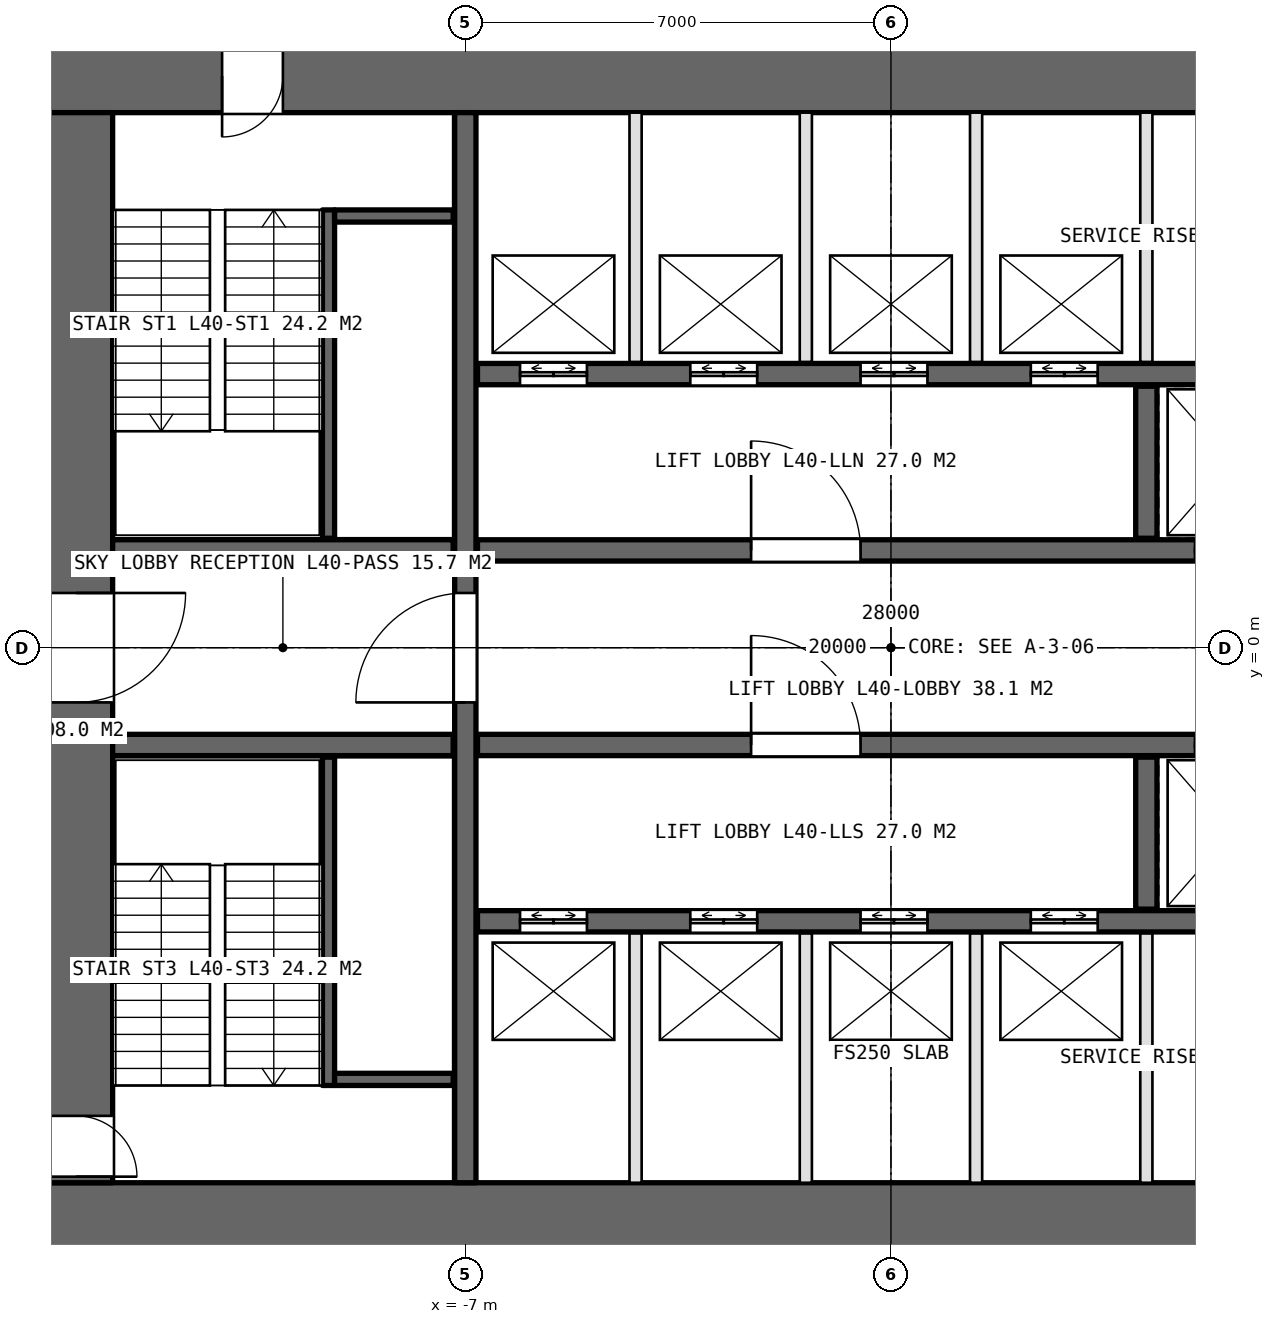
"""IFC4 building model, lengths in metres.
Left out: names, types, materials, properties, quantities, classifications, styles, units other than length and angle.
Written with IfcOpenShell. Run it as: python <this file> out.ifc"""

import sys

from ifc_helpers import new_model, si_unit, direction, frame, frame_2d, origin, place, context, subcontext, project, spatial, rectangle, extrude, element, fill, save


model = new_model("IFC4")
c1 = context("Model", 3, precision=1e-05, world=origin(), true_north=direction((0.0, 1.0)))
c2 = subcontext(c1, "Body", "Model", "MODEL_VIEW")
j1 = project(units=[si_unit("LENGTHUNIT", "METRE"), si_unit("PLANEANGLEUNIT", "RADIAN")], contexts=[c1])
p1 = place(None, origin())
s1 = spatial("IfcSite", under=j1, at=p1, CompositionType="ELEMENT")
p2 = place(p1, origin())
s2 = spatial("IfcBuilding", under=s1, at=p2, CompositionType="ELEMENT")
p3 = place(p2, frame((0.0, 0.0, 184.8)))
s3 = spatial("IfcBuildingStorey", under=s2, at=p3, CompositionType="ELEMENT", Elevation=184.8)
p4 = place(p3, frame((-14.0, -9.4, 0.0), z_axis=(0.0, 0.0, 1.0), x_axis=(1.0, 0.0, 0.0)))
e1 = element("IfcWall", 1, at=p4, inside=s3, PredefinedType="SHEAR", context=c2, shape_type="SweptSolid", body=[
    extrude(rectangle(XDim=28.0, YDim=1.2, at=frame_2d((14.0, 0.0))), origin(), (0.0, 0.0, 1.0), 5.0),
])
p5 = place(p4, frame((22.9, 0.0, 0.0)))
e2 = element("IfcOpeningElement", 2, at=p5, cuts=e1, PredefinedType="OPENING", context=c2, shape_type="SweptSolid", body=[
    extrude(rectangle(XDim=2.2, YDim=2.7, at=frame_2d((1.1, 1.35))), frame((0.0, 0.61, 0.0), z_axis=(0.0, -1.0, 0.0), x_axis=(1.0, 0.0, 0.0)), (0.0, 0.0, 1.0), 1.22),
])
p6 = place(p3, frame((14.0, 9.4, 0.0), z_axis=(0.0, 0.0, 1.0), x_axis=(-1.0, 0.0, 0.0)))
e3 = element("IfcWall", 3, at=p6, inside=s3, PredefinedType="SHEAR", context=c2, shape_type="SweptSolid", body=[
    extrude(rectangle(XDim=28.0, YDim=1.2, at=frame_2d((14.0, 0.0))), origin(), (0.0, 0.0, 1.0), 5.0),
])
p7 = place(p6, frame((24.0, 0.0, 0.0)))
e4 = element("IfcOpeningElement", 4, at=p7, cuts=e3, PredefinedType="OPENING", context=c2, shape_type="SweptSolid", body=[
    extrude(rectangle(XDim=1.0, YDim=2.4, at=frame_2d((0.5, 1.2))), frame((0.0, 0.61, 0.0), z_axis=(0.0, -1.0, 0.0), x_axis=(1.0, 0.0, 0.0)), (0.0, 0.0, 1.0), 1.22),
])
p8 = place(p3, frame((-13.4, 8.8, 0.0), z_axis=(0.0, 0.0, 1.0), x_axis=(0.0, -1.0, 0.0)))
e5 = element("IfcWall", 5, at=p8, inside=s3, PredefinedType="SHEAR", context=c2, shape_type="SweptSolid", body=[
    extrude(rectangle(XDim=17.6, YDim=1.2, at=frame_2d((8.8, 0.0))), origin(), (0.0, 0.0, 1.0), 5.0),
])
p9 = place(p8, frame((7.9, 0.0, 0.0)))
e6 = element("IfcOpeningElement", 6, at=p9, cuts=e5, PredefinedType="OPENING", context=c2, shape_type="SweptSolid", body=[
    extrude(rectangle(XDim=1.8, YDim=2.4, at=frame_2d((0.9, 1.2))), frame((0.0, 0.61, 0.0), z_axis=(0.0, -1.0, 0.0), x_axis=(1.0, 0.0, 0.0)), (0.0, 0.0, 1.0), 1.22),
])
p10 = place(p8, frame((16.5, 0.0, 0.0)))
e7 = element("IfcOpeningElement", 7, at=p10, cuts=e5, PredefinedType="OPENING", context=c2, shape_type="SweptSolid", body=[
    extrude(rectangle(XDim=1.0, YDim=2.4, at=frame_2d((0.5, 1.2))), frame((0.0, 0.61, 0.0), z_axis=(0.0, -1.0, 0.0), x_axis=(1.0, 0.0, 0.0)), (0.0, 0.0, 1.0), 1.22),
])
p11 = place(p3, frame((-7.0, -8.8, 0.0), z_axis=(0.0, 0.0, 1.0), x_axis=(0.0, 1.0, 0.0)))
e8 = element("IfcWall", 8, at=p11, inside=s3, PredefinedType="SHEAR", context=c2, shape_type="SweptSolid", body=[
    extrude(rectangle(XDim=17.6, YDim=0.35, at=frame_2d((8.8, 0.0))), origin(), (0.0, 0.0, 1.0), 5.0),
])
p12 = place(p11, frame((7.9, 0.0, 0.0)))
e9 = element("IfcOpeningElement", 9, at=p12, cuts=e8, PredefinedType="OPENING", context=c2, shape_type="SweptSolid", body=[
    extrude(rectangle(XDim=1.8, YDim=2.4, at=frame_2d((0.9, 1.2))), frame((0.0, 0.185, 0.0), z_axis=(0.0, -1.0, 0.0), x_axis=(1.0, 0.0, 0.0)), (0.0, 0.0, 1.0), 0.37),
])
p13 = place(p3, frame((-6.8, 1.6, 0.0), z_axis=(0.0, 0.0, 1.0), x_axis=(1.0, 0.0, 0.0)))
e10 = element("IfcWall", 10, at=p13, inside=s3, PredefinedType="SHEAR", context=c2, shape_type="SweptSolid", body=[
    extrude(rectangle(XDim=13.6, YDim=0.35, at=frame_2d((6.8, 0.0))), origin(), (0.0, 0.0, 1.0), 5.0),
])
p14 = place(p13, frame((4.5, 0.0, 0.0)))
e11 = element("IfcOpeningElement", 11, at=p14, cuts=e10, PredefinedType="OPENING", context=c2, shape_type="SweptSolid", body=[
    extrude(rectangle(XDim=1.8, YDim=2.4, at=frame_2d((0.9, 1.2))), frame((0.0, 0.185, 0.0), z_axis=(0.0, -1.0, 0.0), x_axis=(1.0, 0.0, 0.0)), (0.0, 0.0, 1.0), 0.37),
])
p15 = place(p13, frame((11.8, 0.0, 0.0)))
e12 = element("IfcOpeningElement", 12, at=p15, cuts=e10, PredefinedType="OPENING", context=c2, shape_type="SweptSolid", body=[
    extrude(rectangle(XDim=1.3, YDim=2.4, at=frame_2d((0.65, 1.2))), frame((0.0, 0.185, 0.0), z_axis=(0.0, -1.0, 0.0), x_axis=(1.0, 0.0, 0.0)), (0.0, 0.0, 1.0), 0.37),
])
p16 = place(p3, frame((-6.8, -1.6, 0.0), z_axis=(0.0, 0.0, 1.0), x_axis=(1.0, 0.0, 0.0)))
e13 = element("IfcWall", 13, at=p16, inside=s3, PredefinedType="SHEAR", context=c2, shape_type="SweptSolid", body=[
    extrude(rectangle(XDim=13.6, YDim=0.35, at=frame_2d((6.8, 0.0))), origin(), (0.0, 0.0, 1.0), 5.0),
])
p17 = place(p16, frame((4.5, 0.0, 0.0)))
e14 = element("IfcOpeningElement", 14, at=p17, cuts=e13, PredefinedType="OPENING", context=c2, shape_type="SweptSolid", body=[
    extrude(rectangle(XDim=1.8, YDim=2.4, at=frame_2d((0.9, 1.2))), frame((0.0, 0.185, 0.0), z_axis=(0.0, -1.0, 0.0), x_axis=(1.0, 0.0, 0.0)), (0.0, 0.0, 1.0), 0.37),
])
p18 = place(p16, frame((11.8, 0.0, 0.0)))
e15 = element("IfcOpeningElement", 15, at=p18, cuts=e13, PredefinedType="OPENING", context=c2, shape_type="SweptSolid", body=[
    extrude(rectangle(XDim=1.3, YDim=2.4, at=frame_2d((0.65, 1.2))), frame((0.0, 0.185, 0.0), z_axis=(0.0, -1.0, 0.0), x_axis=(1.0, 0.0, 0.0)), (0.0, 0.0, 1.0), 0.37),
])
p19 = place(p3, frame((-6.8, 4.5, 0.0), z_axis=(0.0, 0.0, 1.0), x_axis=(1.0, 0.0, 0.0)))
e16 = element("IfcWall", 16, at=p19, inside=s3, PredefinedType="SHEAR", context=c2, shape_type="SweptSolid", body=[
    extrude(rectangle(XDim=13.6, YDim=0.35, at=frame_2d((6.8, 0.0))), origin(), (0.0, 0.0, 1.0), 5.0),
])
p20 = place(p19, frame((0.7, 0.0, 0.0)))
e17 = element("IfcOpeningElement", 17, at=p20, cuts=e16, PredefinedType="OPENING", context=c2, shape_type="SweptSolid", body=[
    extrude(rectangle(XDim=1.1, YDim=2.4, at=frame_2d((0.55, 1.2))), frame((0.0, 0.185, 0.0), z_axis=(0.0, -1.0, 0.0), x_axis=(1.0, 0.0, 0.0)), (0.0, 0.0, 1.0), 0.37),
])
p21 = place(p19, frame((3.5, 0.0, 0.0)))
e18 = element("IfcOpeningElement", 18, at=p21, cuts=e16, PredefinedType="OPENING", context=c2, shape_type="SweptSolid", body=[
    extrude(rectangle(XDim=1.1, YDim=2.4, at=frame_2d((0.55, 1.2))), frame((0.0, 0.185, 0.0), z_axis=(0.0, -1.0, 0.0), x_axis=(1.0, 0.0, 0.0)), (0.0, 0.0, 1.0), 0.37),
])
p22 = place(p19, frame((6.3, 0.0, 0.0)))
e19 = element("IfcOpeningElement", 19, at=p22, cuts=e16, PredefinedType="OPENING", context=c2, shape_type="SweptSolid", body=[
    extrude(rectangle(XDim=1.1, YDim=2.4, at=frame_2d((0.55, 1.2))), frame((0.0, 0.185, 0.0), z_axis=(0.0, -1.0, 0.0), x_axis=(1.0, 0.0, 0.0)), (0.0, 0.0, 1.0), 0.37),
])
p23 = place(p19, frame((9.1, 0.0, 0.0)))
e20 = element("IfcOpeningElement", 20, at=p23, cuts=e16, PredefinedType="OPENING", context=c2, shape_type="SweptSolid", body=[
    extrude(rectangle(XDim=1.1, YDim=2.4, at=frame_2d((0.55, 1.2))), frame((0.0, 0.185, 0.0), z_axis=(0.0, -1.0, 0.0), x_axis=(1.0, 0.0, 0.0)), (0.0, 0.0, 1.0), 0.37),
])
p24 = place(p3, frame((-6.8, -4.5, 0.0), z_axis=(0.0, 0.0, 1.0), x_axis=(1.0, 0.0, 0.0)))
e21 = element("IfcWall", 21, at=p24, inside=s3, PredefinedType="SHEAR", context=c2, shape_type="SweptSolid", body=[
    extrude(rectangle(XDim=13.6, YDim=0.35, at=frame_2d((6.8, 0.0))), origin(), (0.0, 0.0, 1.0), 5.0),
])
p25 = place(p24, frame((0.7, 0.0, 0.0)))
e22 = element("IfcOpeningElement", 22, at=p25, cuts=e21, PredefinedType="OPENING", context=c2, shape_type="SweptSolid", body=[
    extrude(rectangle(XDim=1.1, YDim=2.4, at=frame_2d((0.55, 1.2))), frame((0.0, 0.185, 0.0), z_axis=(0.0, -1.0, 0.0), x_axis=(1.0, 0.0, 0.0)), (0.0, 0.0, 1.0), 0.37),
])
p26 = place(p24, frame((3.5, 0.0, 0.0)))
e23 = element("IfcOpeningElement", 23, at=p26, cuts=e21, PredefinedType="OPENING", context=c2, shape_type="SweptSolid", body=[
    extrude(rectangle(XDim=1.1, YDim=2.4, at=frame_2d((0.55, 1.2))), frame((0.0, 0.185, 0.0), z_axis=(0.0, -1.0, 0.0), x_axis=(1.0, 0.0, 0.0)), (0.0, 0.0, 1.0), 0.37),
])
p27 = place(p24, frame((6.3, 0.0, 0.0)))
e24 = element("IfcOpeningElement", 24, at=p27, cuts=e21, PredefinedType="OPENING", context=c2, shape_type="SweptSolid", body=[
    extrude(rectangle(XDim=1.1, YDim=2.4, at=frame_2d((0.55, 1.2))), frame((0.0, 0.185, 0.0), z_axis=(0.0, -1.0, 0.0), x_axis=(1.0, 0.0, 0.0)), (0.0, 0.0, 1.0), 0.37),
])
p28 = place(p24, frame((9.1, 0.0, 0.0)))
e25 = element("IfcOpeningElement", 25, at=p28, cuts=e21, PredefinedType="OPENING", context=c2, shape_type="SweptSolid", body=[
    extrude(rectangle(XDim=1.1, YDim=2.4, at=frame_2d((0.55, 1.2))), frame((0.0, 0.185, 0.0), z_axis=(0.0, -1.0, 0.0), x_axis=(1.0, 0.0, 0.0)), (0.0, 0.0, 1.0), 0.37),
])
for number, where, z_axis, x_axis in (
    (26, (-12.8, 1.6, 0.0), (0.0, 0.0, 1.0), (1.0, 0.0, 0.0)),
    (27, (-12.8, -1.6, 0.0), (0.0, 0.0, 1.0), (1.0, 0.0, 0.0)),
):
    element("IfcWall", number, at=place(p3, frame(where, z_axis=z_axis, x_axis=x_axis)), inside=s3, PredefinedType="SHEAR", context=c2, shape_type="SweptSolid", body=[
        extrude(rectangle(XDim=5.6, YDim=0.35, at=frame_2d((2.8, 0.0))), origin(), (0.0, 0.0, 1.0), 5.0),
    ])
for number, where, z_axis, x_axis in (
    (28, (4.2, 1.8, 0.0), (0.0, 0.0, 1.0), (0.0, 1.0, 0.0)),
    (29, (4.2, -4.3, 0.0), (0.0, 0.0, 1.0), (0.0, 1.0, 0.0)),
):
    element("IfcWall", number, at=place(p3, frame(where, z_axis=z_axis, x_axis=x_axis)), inside=s3, PredefinedType="SHEAR", context=c2, shape_type="SweptSolid", body=[
        extrude(rectangle(XDim=2.5, YDim=0.35, at=frame_2d((1.25, 0.0))), origin(), (0.0, 0.0, 1.0), 5.0),
    ])
for number, where, z_axis, x_axis in (
    (30, (-4.2, 4.7, 0.0), (0.0, 0.0, 1.0), (0.0, 1.0, 0.0)),
    (31, (-1.4, 4.7, 0.0), (0.0, 0.0, 1.0), (0.0, 1.0, 0.0)),
    (32, (1.4, 4.7, 0.0), (0.0, 0.0, 1.0), (0.0, 1.0, 0.0)),
    (33, (4.2, 4.7, 0.0), (0.0, 0.0, 1.0), (0.0, 1.0, 0.0)),
    (34, (-4.2, -4.7, 0.0), (0.0, 0.0, 1.0), (0.0, -1.0, 0.0)),
    (35, (-1.4, -4.7, 0.0), (0.0, 0.0, 1.0), (0.0, -1.0, 0.0)),
    (36, (1.4, -4.7, 0.0), (0.0, 0.0, 1.0), (0.0, -1.0, 0.0)),
    (37, (4.2, -4.7, 0.0), (0.0, 0.0, 1.0), (0.0, -1.0, 0.0)),
):
    element("IfcWall", number, at=place(p3, frame(where, z_axis=z_axis, x_axis=x_axis)), inside=s3, PredefinedType="PARTITIONING", context=c2, shape_type="SweptSolid", body=[
        extrude(rectangle(XDim=4.1, YDim=0.2, at=frame_2d((2.05, 0.0))), origin(), (0.0, 0.0, 1.0), 5.0),
    ])
p29 = place(p3, frame((-9.25, 7.2, 0.0), z_axis=(0.0, 0.0, 1.0), x_axis=(0.0, -1.0, 0.0)))
e38 = element("IfcWall", 38, at=p29, inside=s3, PredefinedType="SOLIDWALL", context=c2, shape_type="SweptSolid", body=[
    extrude(rectangle(XDim=5.4, YDim=0.2, at=frame_2d((2.7, 0.0))), origin(), (0.0, 0.0, 1.0), 5.0),
])
p30 = place(p3, frame((-9.15, 7.1, 0.0), z_axis=(0.0, 0.0, 1.0), x_axis=(1.0, 0.0, 0.0)))
e39 = element("IfcWall", 39, at=p30, inside=s3, PredefinedType="SOLIDWALL", context=c2, shape_type="SweptSolid", body=[
    extrude(rectangle(XDim=1.95, YDim=0.2, at=frame_2d((0.975, 0.0))), origin(), (0.0, 0.0, 1.0), 5.0),
])
p31 = place(p3, frame((-9.25, -7.2, 0.0), z_axis=(0.0, 0.0, 1.0), x_axis=(0.0, 1.0, 0.0)))
e40 = element("IfcWall", 40, at=p31, inside=s3, PredefinedType="SOLIDWALL", context=c2, shape_type="SweptSolid", body=[
    extrude(rectangle(XDim=5.4, YDim=0.2, at=frame_2d((2.7, 0.0))), origin(), (0.0, 0.0, 1.0), 5.0),
])
p32 = place(p3, frame((-9.15, -7.1, 0.0), z_axis=(0.0, 0.0, 1.0), x_axis=(1.0, 0.0, 0.0)))
e41 = element("IfcWall", 41, at=p32, inside=s3, PredefinedType="SOLIDWALL", context=c2, shape_type="SweptSolid", body=[
    extrude(rectangle(XDim=1.95, YDim=0.2, at=frame_2d((0.975, 0.0))), origin(), (0.0, 0.0, 1.0), 5.0),
])
p33 = place(p9, origin())
e42 = element("IfcDoor", 42, at=p33, inside=s3, OperationType="DOUBLE_DOOR_SINGLE_SWING", PredefinedType="DOOR", context=c2, shape_type="SweptSolid", body=[
    extrude(rectangle(XDim=1.8, YDim=2.4, at=frame_2d((0.9, 1.2))), frame((0.0, 0.025, 0.0), z_axis=(0.0, -1.0, 0.0), x_axis=(1.0, 0.0, 0.0)), (0.0, 0.0, 1.0), 0.05),
])
fill(e6, e42)
p34 = place(p12, origin())
e43 = element("IfcDoor", 43, at=p34, inside=s3, OperationType="DOUBLE_DOOR_SINGLE_SWING", PredefinedType="DOOR", context=c2, shape_type="SweptSolid", body=[
    extrude(rectangle(XDim=1.8, YDim=2.4, at=frame_2d((0.9, 1.2))), frame((0.0, 0.025, 0.0), z_axis=(0.0, -1.0, 0.0), x_axis=(1.0, 0.0, 0.0)), (0.0, 0.0, 1.0), 0.05),
])
fill(e9, e43)
p35 = place(p7, origin())
e44 = element("IfcDoor", 44, at=p35, inside=s3, OperationType="SINGLE_SWING_RIGHT", PredefinedType="DOOR", context=c2, shape_type="SweptSolid", body=[
    extrude(rectangle(XDim=1.0, YDim=2.4, at=frame_2d((0.5, 1.2))), frame((0.0, 0.025, 0.0), z_axis=(0.0, -1.0, 0.0), x_axis=(1.0, 0.0, 0.0)), (0.0, 0.0, 1.0), 0.05),
])
fill(e4, e44)
p36 = place(p10, origin())
e45 = element("IfcDoor", 45, at=p36, inside=s3, OperationType="SINGLE_SWING_RIGHT", PredefinedType="DOOR", context=c2, shape_type="SweptSolid", body=[
    extrude(rectangle(XDim=1.0, YDim=2.4, at=frame_2d((0.5, 1.2))), frame((0.0, 0.025, 0.0), z_axis=(0.0, -1.0, 0.0), x_axis=(1.0, 0.0, 0.0)), (0.0, 0.0, 1.0), 0.05),
])
fill(e7, e45)
p37 = place(p14, origin())
e46 = element("IfcDoor", 46, at=p37, inside=s3, OperationType="DOUBLE_DOOR_SINGLE_SWING", PredefinedType="DOOR", context=c2, shape_type="SweptSolid", body=[
    extrude(rectangle(XDim=1.8, YDim=2.4, at=frame_2d((0.9, 1.2))), frame((0.0, 0.025, 0.0), z_axis=(0.0, -1.0, 0.0), x_axis=(1.0, 0.0, 0.0)), (0.0, 0.0, 1.0), 0.05),
])
fill(e11, e46)
p38 = place(p17, origin())
e47 = element("IfcDoor", 47, at=p38, inside=s3, OperationType="DOUBLE_DOOR_SINGLE_SWING", PredefinedType="DOOR", context=c2, shape_type="SweptSolid", body=[
    extrude(rectangle(XDim=1.8, YDim=2.4, at=frame_2d((0.9, 1.2))), frame((0.0, 0.025, 0.0), z_axis=(0.0, -1.0, 0.0), x_axis=(1.0, 0.0, 0.0)), (0.0, 0.0, 1.0), 0.05),
])
fill(e14, e47)
p39 = place(p20, origin())
e48 = element("IfcDoor", 48, at=p39, inside=s3, OperationType="DOUBLE_DOOR_SLIDING", PredefinedType="DOOR", context=c2, shape_type="SweptSolid", body=[
    extrude(rectangle(XDim=1.1, YDim=2.4, at=frame_2d((0.55, 1.2))), frame((0.0, 0.025, 0.0), z_axis=(0.0, -1.0, 0.0), x_axis=(1.0, 0.0, 0.0)), (0.0, 0.0, 1.0), 0.05),
])
fill(e17, e48)
p40 = place(p25, origin())
e49 = element("IfcDoor", 49, at=p40, inside=s3, OperationType="DOUBLE_DOOR_SLIDING", PredefinedType="DOOR", context=c2, shape_type="SweptSolid", body=[
    extrude(rectangle(XDim=1.1, YDim=2.4, at=frame_2d((0.55, 1.2))), frame((0.0, 0.025, 0.0), z_axis=(0.0, -1.0, 0.0), x_axis=(1.0, 0.0, 0.0)), (0.0, 0.0, 1.0), 0.05),
])
fill(e22, e49)
p41 = place(p21, origin())
e50 = element("IfcDoor", 50, at=p41, inside=s3, OperationType="DOUBLE_DOOR_SLIDING", PredefinedType="DOOR", context=c2, shape_type="SweptSolid", body=[
    extrude(rectangle(XDim=1.1, YDim=2.4, at=frame_2d((0.55, 1.2))), frame((0.0, 0.025, 0.0), z_axis=(0.0, -1.0, 0.0), x_axis=(1.0, 0.0, 0.0)), (0.0, 0.0, 1.0), 0.05),
])
fill(e18, e50)
p42 = place(p26, origin())
e51 = element("IfcDoor", 51, at=p42, inside=s3, OperationType="DOUBLE_DOOR_SLIDING", PredefinedType="DOOR", context=c2, shape_type="SweptSolid", body=[
    extrude(rectangle(XDim=1.1, YDim=2.4, at=frame_2d((0.55, 1.2))), frame((0.0, 0.025, 0.0), z_axis=(0.0, -1.0, 0.0), x_axis=(1.0, 0.0, 0.0)), (0.0, 0.0, 1.0), 0.05),
])
fill(e23, e51)
p43 = place(p22, origin())
e52 = element("IfcDoor", 52, at=p43, inside=s3, OperationType="DOUBLE_DOOR_SLIDING", PredefinedType="DOOR", context=c2, shape_type="SweptSolid", body=[
    extrude(rectangle(XDim=1.1, YDim=2.4, at=frame_2d((0.55, 1.2))), frame((0.0, 0.025, 0.0), z_axis=(0.0, -1.0, 0.0), x_axis=(1.0, 0.0, 0.0)), (0.0, 0.0, 1.0), 0.05),
])
fill(e19, e52)
p44 = place(p27, origin())
e53 = element("IfcDoor", 53, at=p44, inside=s3, OperationType="DOUBLE_DOOR_SLIDING", PredefinedType="DOOR", context=c2, shape_type="SweptSolid", body=[
    extrude(rectangle(XDim=1.1, YDim=2.4, at=frame_2d((0.55, 1.2))), frame((0.0, 0.025, 0.0), z_axis=(0.0, -1.0, 0.0), x_axis=(1.0, 0.0, 0.0)), (0.0, 0.0, 1.0), 0.05),
])
fill(e24, e53)
p45 = place(p23, origin())
e54 = element("IfcDoor", 54, at=p45, inside=s3, OperationType="DOUBLE_DOOR_SLIDING", PredefinedType="DOOR", context=c2, shape_type="SweptSolid", body=[
    extrude(rectangle(XDim=1.1, YDim=2.4, at=frame_2d((0.55, 1.2))), frame((0.0, 0.025, 0.0), z_axis=(0.0, -1.0, 0.0), x_axis=(1.0, 0.0, 0.0)), (0.0, 0.0, 1.0), 0.05),
])
fill(e20, e54)
p46 = place(p28, origin())
e55 = element("IfcDoor", 55, at=p46, inside=s3, OperationType="DOUBLE_DOOR_SLIDING", PredefinedType="DOOR", context=c2, shape_type="SweptSolid", body=[
    extrude(rectangle(XDim=1.1, YDim=2.4, at=frame_2d((0.55, 1.2))), frame((0.0, 0.025, 0.0), z_axis=(0.0, -1.0, 0.0), x_axis=(1.0, 0.0, 0.0)), (0.0, 0.0, 1.0), 0.05),
])
fill(e25, e55)
p47 = place(p15, origin())
e56 = element("IfcDoor", 56, at=p47, inside=s3, OperationType="DOUBLE_DOOR_SLIDING", PredefinedType="DOOR", context=c2, shape_type="SweptSolid", body=[
    extrude(rectangle(XDim=1.3, YDim=2.4, at=frame_2d((0.65, 1.2))), frame((0.0, 0.025, 0.0), z_axis=(0.0, -1.0, 0.0), x_axis=(1.0, 0.0, 0.0)), (0.0, 0.0, 1.0), 0.05),
])
fill(e12, e56)
p48 = place(p18, origin())
e57 = element("IfcDoor", 57, at=p48, inside=s3, OperationType="DOUBLE_DOOR_SLIDING", PredefinedType="DOOR", context=c2, shape_type="SweptSolid", body=[
    extrude(rectangle(XDim=1.3, YDim=2.4, at=frame_2d((0.65, 1.2))), frame((0.0, 0.025, 0.0), z_axis=(0.0, -1.0, 0.0), x_axis=(1.0, 0.0, 0.0)), (0.0, 0.0, 1.0), 0.05),
])
fill(e15, e57)
save(model, sys.argv[1])
